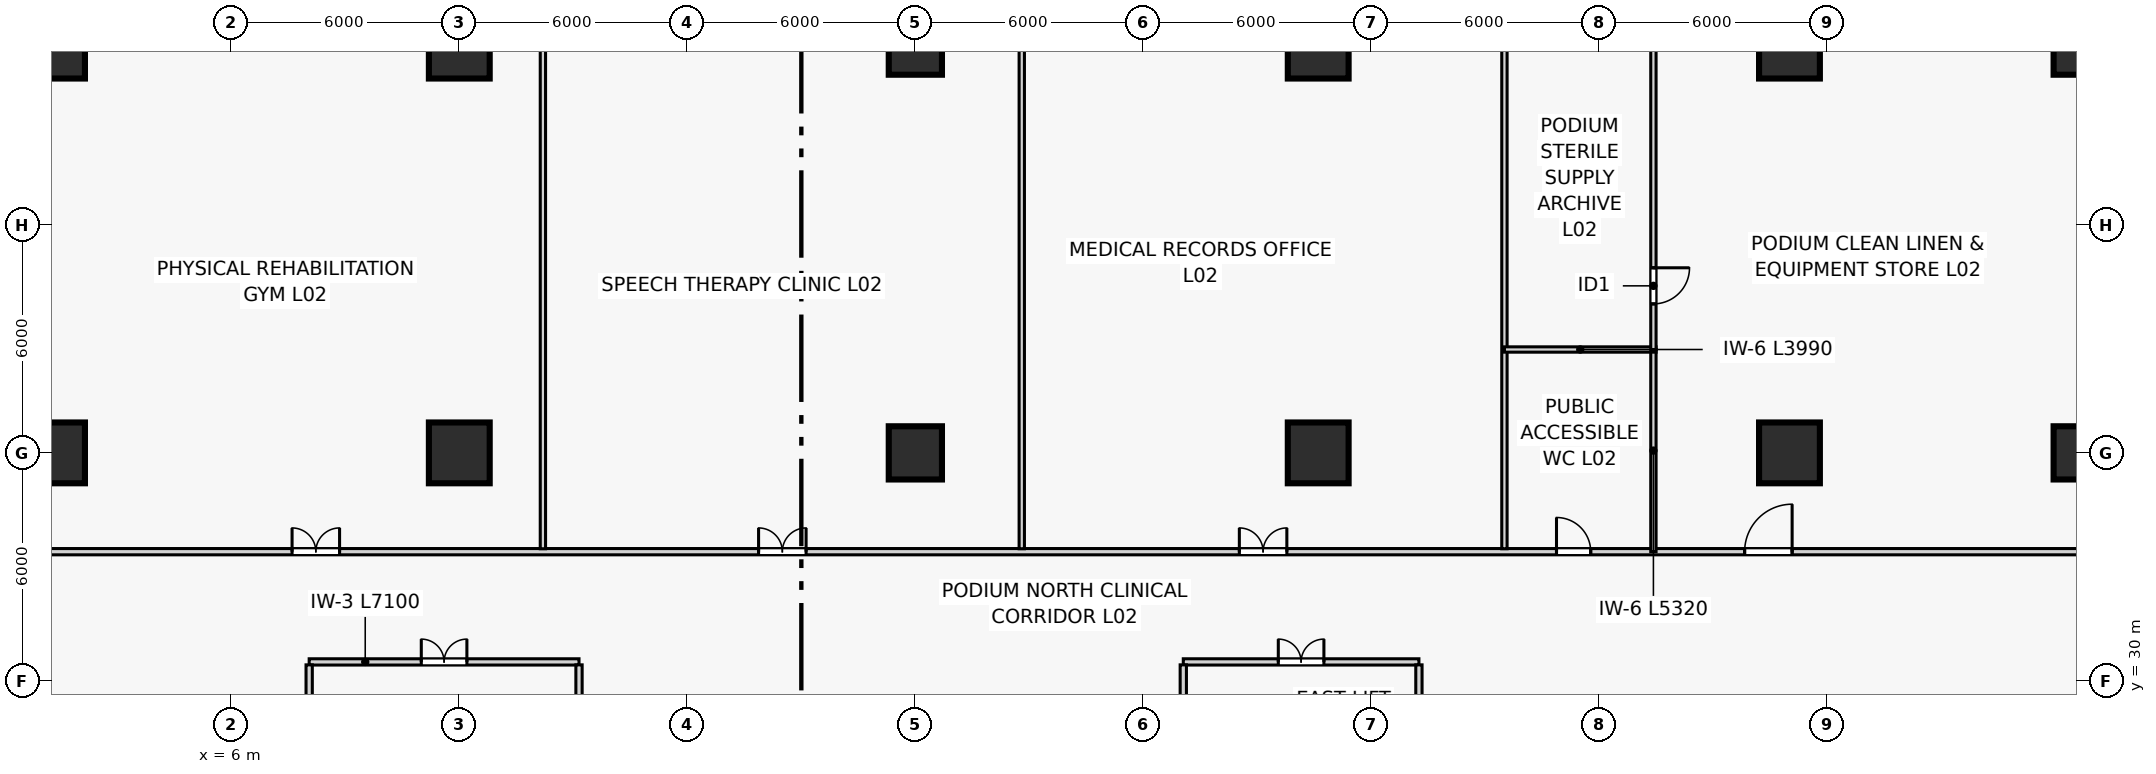
"""IFC4 building model, lengths in metres.
Left out: names, types, materials, properties, quantities, classifications, styles, units other than length and angle.
Written with IfcOpenShell. Run it as: python <this file> out.ifc"""

import sys

from ifc_helpers import new_model, si_unit, direction, frame, frame_2d, origin, origin_2d, place, context, subcontext, project, spatial, rectangle, extrude, source, transform, mapped, element, fill, save


model = new_model("IFC4")
c1 = context("Model", 3, precision=1e-05, world=origin(), true_north=direction((0.0, 1.0)))
c2 = subcontext(c1, "Body", "Model", "MODEL_VIEW")
j1 = project(units=[si_unit("LENGTHUNIT", "METRE"), si_unit("PLANEANGLEUNIT", "RADIAN")], contexts=[c1])
p1 = place(None, origin())
s1 = spatial("IfcSite", under=j1, at=p1, CompositionType="ELEMENT")
p2 = place(p1, origin())
s2 = spatial("IfcBuilding", under=s1, at=p2, CompositionType="ELEMENT")
p3 = place(p2, frame((0.0, 0.0, 9.0)))
s3 = spatial("IfcBuildingStorey", under=s2, at=p3, CompositionType="ELEMENT", Elevation=9.0)
m1 = source(origin(), c2, "Body", "SweptSolid", [
    extrude(rectangle(XDim=1.6, YDim=1.6, at=origin_2d()), origin(), (0.0, 0.0, 1.0), 4.5),
])
for number, where, z_axis, x_axis in (
    (1, (1.35, 36.0, 0.0), (0.0, 0.0, 1.0), (1.0, 0.0, 0.0)),
    (2, (1.35, 46.65, 0.0), (0.0, 0.0, 1.0), (1.0, 0.0, 0.0)),
    (3, (12.0, 36.0, 0.0), (0.0, 0.0, 1.0), (1.0, 0.0, 0.0)),
    (4, (12.0, 46.65, 0.0), (0.0, 0.0, 1.0), (1.0, 0.0, 0.0)),
):
    element("IfcColumn", number, at=place(p3, frame(where, z_axis=z_axis, x_axis=x_axis)), inside=s3, PredefinedType="COLUMN", context=c2, shape_type="MappedRepresentation", body=[
        mapped(m1, transform((0.0, 0.0, 0.0), scale=1.0)),
    ])
m2 = source(origin(), c2, "Body", "SweptSolid", [
    extrude(rectangle(XDim=1.4, YDim=1.4, at=origin_2d()), origin(), (0.0, 0.0, 1.0), 4.5),
])
for number, where, z_axis, x_axis in (
    (5, (24.0, 36.0, 0.0), (0.0, 0.0, 1.0), (1.0, 0.0, 0.0)),
    (6, (24.0, 46.65, 0.0), (0.0, 0.0, 1.0), (1.0, 0.0, 0.0)),
):
    element("IfcColumn", number, at=place(p3, frame(where, z_axis=z_axis, x_axis=x_axis)), inside=s3, PredefinedType="COLUMN", context=c2, shape_type="MappedRepresentation", body=[
        mapped(m2, transform((0.0, 0.0, 0.0), scale=1.0)),
    ])
for number, where, z_axis, x_axis in (
    (7, (34.6, 36.0, 0.0), (0.0, 0.0, 1.0), (1.0, 0.0, 0.0)),
    (8, (34.6, 46.65, 0.0), (0.0, 0.0, 1.0), (1.0, 0.0, 0.0)),
    (9, (47.0, 36.0, 0.0), (0.0, 0.0, 1.0), (1.0, 0.0, 0.0)),
    (10, (47.0, 46.65, 0.0), (0.0, 0.0, 1.0), (1.0, 0.0, 0.0)),
):
    element("IfcColumn", number, at=place(p3, frame(where, z_axis=z_axis, x_axis=x_axis)), inside=s3, PredefinedType="COLUMN", context=c2, shape_type="MappedRepresentation", body=[
        mapped(m1, transform((0.0, 0.0, 0.0), scale=1.0)),
    ])
for number, where, z_axis, x_axis in (
    (11, (54.65, 36.0, 0.0), (0.0, 0.0, 1.0), (1.0, 0.0, 0.0)),
    (12, (54.65, 46.65, 0.0), (0.0, 0.0, 1.0), (1.0, 0.0, 0.0)),
):
    element("IfcColumn", number, at=place(p3, frame(where, z_axis=z_axis, x_axis=x_axis)), inside=s3, PredefinedType="COLUMN", context=c2, shape_type="MappedRepresentation", body=[
        mapped(m2, transform((0.0, 0.0, 0.0), scale=1.0)),
    ])
p4 = place(p3, frame((8.05, 30.5, 0.0), z_axis=(0.0, 0.0, 1.0), x_axis=(1.0, 0.0, 0.0)))
e13 = element("IfcWall", 13, at=p4, inside=s3, PredefinedType="PARTITIONING", context=c2, shape_type="SweptSolid", body=[
    extrude(rectangle(XDim=7.1, YDim=0.165, at=frame_2d((3.55, 0.0))), origin(), (0.0, 0.0, 1.0), 4.16),
])
p5 = place(p4, frame((2.95, 0.0, 0.0)))
e14 = element("IfcOpeningElement", 14, at=p5, cuts=e13, PredefinedType="OPENING", context=c2, shape_type="SweptSolid", body=[
    extrude(rectangle(XDim=1.2, YDim=2.2, at=frame_2d((0.6, 1.1))), frame((0.0, 0.093, 0.0), z_axis=(0.0, -1.0, 0.0), x_axis=(1.0, 0.0, 0.0)), (0.0, 0.0, 1.0), 0.185),
])
for number, where, z_axis, x_axis in (
    (15, (8.05, 27.62, 0.0), (0.0, 0.0, 1.0), (0.0, 1.0, 0.0)),
    (16, (15.15, 27.62, 0.0), (0.0, 0.0, 1.0), (0.0, 1.0, 0.0)),
):
    element("IfcWall", number, at=place(p3, frame(where, z_axis=z_axis, x_axis=x_axis)), inside=s3, PredefinedType="PARTITIONING", context=c2, shape_type="SweptSolid", body=[
        extrude(rectangle(XDim=2.802, YDim=0.165, at=frame_2d((1.401, 0.0))), origin(), (0.0, 0.0, 1.0), 4.16),
    ])
p6 = place(p3, frame((31.05, 30.5, 0.0), z_axis=(0.0, 0.0, 1.0), x_axis=(1.0, 0.0, 0.0)))
e17 = element("IfcWall", 17, at=p6, inside=s3, PredefinedType="PARTITIONING", context=c2, shape_type="SweptSolid", body=[
    extrude(rectangle(XDim=6.2, YDim=0.165, at=frame_2d((3.1, 0.0))), origin(), (0.0, 0.0, 1.0), 4.16),
])
p7 = place(p6, frame((2.5, 0.0, 0.0)))
e18 = element("IfcOpeningElement", 18, at=p7, cuts=e17, PredefinedType="OPENING", context=c2, shape_type="SweptSolid", body=[
    extrude(rectangle(XDim=1.2, YDim=2.2, at=frame_2d((0.6, 1.1))), frame((0.0, 0.093, 0.0), z_axis=(0.0, -1.0, 0.0), x_axis=(1.0, 0.0, 0.0)), (0.0, 0.0, 1.0), 0.185),
])
for number, where, z_axis, x_axis in (
    (19, (31.05, 27.62, 0.0), (0.0, 0.0, 1.0), (0.0, 1.0, 0.0)),
    (20, (37.25, 27.62, 0.0), (0.0, 0.0, 1.0), (0.0, 1.0, 0.0)),
):
    element("IfcWall", number, at=place(p3, frame(where, z_axis=z_axis, x_axis=x_axis)), inside=s3, PredefinedType="PARTITIONING", context=c2, shape_type="SweptSolid", body=[
        extrude(rectangle(XDim=2.802, YDim=0.165, at=frame_2d((1.401, 0.0))), origin(), (0.0, 0.0, 1.0), 4.16),
    ])
p8 = place(p3, frame((0.185, 33.4, 0.0), z_axis=(0.0, 0.0, 1.0), x_axis=(1.0, 0.0, 0.0)))
e21 = element("IfcWall", 21, at=p8, inside=s3, PredefinedType="PARTITIONING", context=c2, shape_type="SweptSolid", body=[
    extrude(rectangle(XDim=55.63, YDim=0.165, at=frame_2d((27.815, 0.0))), origin(), (0.0, 0.0, 1.0), 4.16),
])
p9 = place(p8, frame((7.415, 0.0, 0.0)))
e22 = element("IfcOpeningElement", 22, at=p9, cuts=e21, PredefinedType="OPENING", context=c2, shape_type="SweptSolid", body=[
    extrude(rectangle(XDim=1.25, YDim=2.2, at=frame_2d((0.625, 1.1))), frame((0.0, 0.093, 0.0), z_axis=(0.0, -1.0, 0.0), x_axis=(1.0, 0.0, 0.0)), (0.0, 0.0, 1.0), 0.185),
])
p10 = place(p8, frame((19.69, 0.0, 0.0)))
e23 = element("IfcOpeningElement", 23, at=p10, cuts=e21, PredefinedType="OPENING", context=c2, shape_type="SweptSolid", body=[
    extrude(rectangle(XDim=1.25, YDim=2.2, at=frame_2d((0.625, 1.1))), frame((0.0, 0.093, 0.0), z_axis=(0.0, -1.0, 0.0), x_axis=(1.0, 0.0, 0.0)), (0.0, 0.0, 1.0), 0.185),
])
p11 = place(p8, frame((32.34, 0.0, 0.0)))
e24 = element("IfcOpeningElement", 24, at=p11, cuts=e21, PredefinedType="OPENING", context=c2, shape_type="SweptSolid", body=[
    extrude(rectangle(XDim=1.25, YDim=2.2, at=frame_2d((0.625, 1.1))), frame((0.0, 0.093, 0.0), z_axis=(0.0, -1.0, 0.0), x_axis=(1.0, 0.0, 0.0)), (0.0, 0.0, 1.0), 0.185),
])
p12 = place(p8, frame((40.685, 0.0, 0.0)))
e25 = element("IfcOpeningElement", 25, at=p12, cuts=e21, PredefinedType="OPENING", context=c2, shape_type="SweptSolid", body=[
    extrude(rectangle(XDim=0.9, YDim=2.1, at=frame_2d((0.45, 1.05))), frame((0.0, 0.093, 0.0), z_axis=(0.0, -1.0, 0.0), x_axis=(1.0, 0.0, 0.0)), (0.0, 0.0, 1.0), 0.185),
])
p13 = place(p8, frame((45.635, 0.0, 0.0)))
e26 = element("IfcOpeningElement", 26, at=p13, cuts=e21, PredefinedType="OPENING", context=c2, shape_type="SweptSolid", body=[
    extrude(rectangle(XDim=1.25, YDim=2.2, at=frame_2d((0.625, 1.1))), frame((0.0, 0.093, 0.0), z_axis=(0.0, -1.0, 0.0), x_axis=(1.0, 0.0, 0.0)), (0.0, 0.0, 1.0), 0.185),
])
for number, where, z_axis, x_axis in (
    (27, (14.2, 33.478, 0.0), (0.0, 0.0, 1.0), (0.0, 1.0, 0.0)),
    (28, (26.8, 33.478, 0.0), (0.0, 0.0, 1.0), (0.0, 1.0, 0.0)),
    (29, (39.5, 33.478, 0.0), (0.0, 0.0, 1.0), (0.0, 1.0, 0.0)),
):
    element("IfcWall", number, at=place(p3, frame(where, z_axis=z_axis, x_axis=x_axis)), inside=s3, PredefinedType="PARTITIONING", context=c2, shape_type="SweptSolid", body=[
        extrude(rectangle(XDim=14.337, YDim=0.14, at=frame_2d((7.169, 0.0))), origin(), (0.0, 0.0, 1.0), 4.16),
    ])
p14 = place(p3, frame((43.42, 33.4, 0.0), z_axis=(0.0, 0.0, 1.0), x_axis=(0.0, 1.0, 0.0)))
e30 = element("IfcWall", 30, at=p14, inside=s3, PredefinedType="PLUMBINGWALL", context=c2, shape_type="SweptSolid", body=[
    extrude(rectangle(XDim=5.32, YDim=0.14, at=frame_2d((2.66, 0.0))), origin(), (0.0, 0.0, 1.0), 4.16),
])
p15 = place(p3, frame((39.5, 38.72, 0.0), z_axis=(0.0, 0.0, 1.0), x_axis=(1.0, 0.0, 0.0)))
e31 = element("IfcWall", 31, at=p15, inside=s3, PredefinedType="PLUMBINGWALL", context=c2, shape_type="SweptSolid", body=[
    extrude(rectangle(XDim=3.99, YDim=0.14, at=frame_2d((1.995, 0.0))), origin(), (0.0, 0.0, 1.0), 4.16),
])
p16 = place(p3, frame((43.42, 38.72, 0.0), z_axis=(0.0, 0.0, 1.0), x_axis=(0.0, 1.0, 0.0)))
e32 = element("IfcWall", 32, at=p16, inside=s3, PredefinedType="PARTITIONING", context=c2, shape_type="SweptSolid", body=[
    extrude(rectangle(XDim=9.095, YDim=0.14, at=frame_2d((4.547, 0.0))), origin(), (0.0, 0.0, 1.0), 4.16),
])
p17 = place(p16, frame((1.2, 0.0, 0.0)))
e33 = element("IfcOpeningElement", 33, at=p17, cuts=e32, PredefinedType="OPENING", context=c2, shape_type="SweptSolid", body=[
    extrude(rectangle(XDim=0.95, YDim=2.1, at=frame_2d((0.475, 1.05))), frame((0.0, 0.08, 0.0), z_axis=(0.0, -1.0, 0.0), x_axis=(1.0, 0.0, 0.0)), (0.0, 0.0, 1.0), 0.16),
])
m3 = source(origin(), c2, "Body", "SweptSolid", [
    extrude(rectangle(XDim=1.2, YDim=2.2, at=frame_2d((0.6, 1.1))), frame((0.0, 0.025, 0.0), z_axis=(0.0, -1.0, 0.0), x_axis=(1.0, 0.0, 0.0)), (0.0, 0.0, 1.0), 0.05),
])
p18 = place(p5, origin())
e34 = element("IfcDoor", 34, at=p18, inside=s3, OperationType="DOUBLE_DOOR_SINGLE_SWING", PredefinedType="DOOR", context=c2, shape_type="MappedRepresentation", body=[
    mapped(m3, transform((0.0, 0.0, 0.0), scale=1.0)),
])
fill(e14, e34)
p19 = place(p7, origin())
e35 = element("IfcDoor", 35, at=p19, inside=s3, OperationType="DOUBLE_DOOR_SINGLE_SWING", PredefinedType="DOOR", context=c2, shape_type="MappedRepresentation", body=[
    mapped(m3, transform((0.0, 0.0, 0.0), scale=1.0)),
])
fill(e18, e35)
m4 = source(origin(), c2, "Body", "SweptSolid", [
    extrude(rectangle(XDim=1.25, YDim=2.2, at=frame_2d((0.625, 1.1))), frame((0.0, 0.025, 0.0), z_axis=(0.0, -1.0, 0.0), x_axis=(1.0, 0.0, 0.0)), (0.0, 0.0, 1.0), 0.05),
])
p20 = place(p9, origin())
e36 = element("IfcDoor", 36, at=p20, inside=s3, OperationType="DOUBLE_DOOR_SINGLE_SWING", PredefinedType="DOOR", context=c2, shape_type="MappedRepresentation", body=[
    mapped(m4, transform((0.0, 0.0, 0.0), scale=1.0)),
])
fill(e22, e36)
p21 = place(p10, origin())
e37 = element("IfcDoor", 37, at=p21, inside=s3, OperationType="DOUBLE_DOOR_SINGLE_SWING", PredefinedType="DOOR", context=c2, shape_type="MappedRepresentation", body=[
    mapped(m4, transform((0.0, 0.0, 0.0), scale=1.0)),
])
fill(e23, e37)
p22 = place(p11, origin())
e38 = element("IfcDoor", 38, at=p22, inside=s3, OperationType="DOUBLE_DOOR_SINGLE_SWING", PredefinedType="DOOR", context=c2, shape_type="MappedRepresentation", body=[
    mapped(m4, transform((0.0, 0.0, 0.0), scale=1.0)),
])
fill(e24, e38)
m5 = source(origin(), c2, "Body", "SweptSolid", [
    extrude(rectangle(XDim=0.9, YDim=2.1, at=frame_2d((0.45, 1.05))), frame((0.0, 0.025, 0.0), z_axis=(0.0, -1.0, 0.0), x_axis=(1.0, 0.0, 0.0)), (0.0, 0.0, 1.0), 0.05),
])
p23 = place(p12, origin())
e39 = element("IfcDoor", 39, at=p23, inside=s3, OperationType="SINGLE_SWING_LEFT", PredefinedType="DOOR", context=c2, shape_type="MappedRepresentation", body=[
    mapped(m5, transform((0.0, 0.0, 0.0), scale=1.0)),
])
fill(e25, e39)
p24 = place(p13, origin())
e40 = element("IfcDoor", 40, at=p24, inside=s3, OperationType="SINGLE_SWING_RIGHT", PredefinedType="DOOR", context=c2, shape_type="MappedRepresentation", body=[
    mapped(m4, transform((0.0, 0.0, 0.0), scale=1.0)),
])
fill(e26, e40)
m6 = source(origin(), c2, "Body", "SweptSolid", [
    extrude(rectangle(XDim=0.95, YDim=2.1, at=frame_2d((0.475, 1.05))), frame((0.0, 0.025, 0.0), z_axis=(0.0, -1.0, 0.0), x_axis=(1.0, 0.0, 0.0)), (0.0, 0.0, 1.0), 0.05),
])
p25 = place(p17, frame((0.95, 0.0, 0.0), z_axis=(0.0, 0.0, 1.0), x_axis=(-1.0, 0.0, 0.0)))
e41 = element("IfcDoor", 41, at=p25, inside=s3, OperationType="SINGLE_SWING_LEFT", PredefinedType="DOOR", context=c2, shape_type="MappedRepresentation", body=[
    mapped(m6, transform((0.0, 0.0, 0.0), scale=1.0)),
])
fill(e33, e41)
save(model, sys.argv[1])
